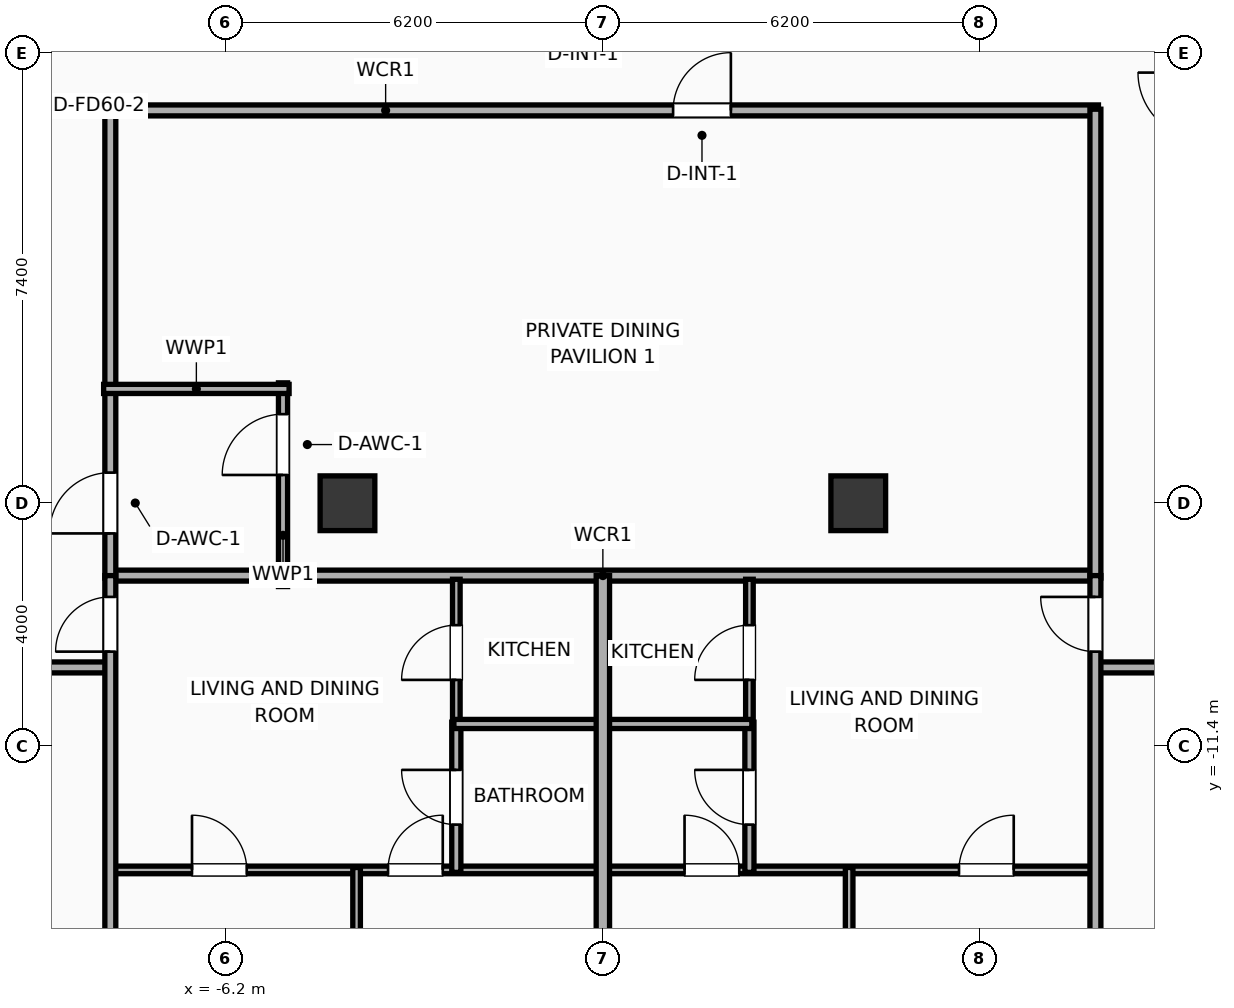
"""IFC4 building model, lengths in metres.
Left out: names, types, materials, properties, quantities, classifications, styles, units other than length and angle.
Written with IfcOpenShell. Run it as: python <this file> out.ifc"""

import sys

from ifc_helpers import new_model, si_unit, direction, frame, frame_2d, origin, origin_2d, place, context, subcontext, project, spatial, rectangle, extrude, element, fill, save


model = new_model("IFC4")
c1 = context("Model", 3, precision=1e-05, world=origin(), true_north=direction((0.0, 1.0)))
c2 = subcontext(c1, "Body", "Model", "MODEL_VIEW")
j1 = project(units=[si_unit("LENGTHUNIT", "METRE"), si_unit("PLANEANGLEUNIT", "RADIAN")], contexts=[c1])
p1 = place(None, origin())
s1 = spatial("IfcSite", under=j1, at=p1, CompositionType="ELEMENT")
p2 = place(p1, origin())
s2 = spatial("IfcBuilding", under=s1, at=p2, CompositionType="ELEMENT")
p3 = place(p2, frame((0.0, 0.0, 179.4)))
s3 = spatial("IfcBuildingStorey", under=s2, at=p3, CompositionType="ELEMENT", Elevation=179.4)
for number, where, z_axis, x_axis in (
    (1, (-4.2, -7.4, 0.0), (0.0, 0.0, 1.0), (1.0, 0.0, 0.0)),
    (2, (4.2, -7.4, 0.0), (0.0, 0.0, 1.0), (1.0, 0.0, 0.0)),
):
    element("IfcColumn", number, at=place(p3, frame(where, z_axis=z_axis, x_axis=x_axis)), inside=s3, PredefinedType="COLUMN", context=c2, shape_type="SweptSolid", body=[
        extrude(rectangle(XDim=0.9, YDim=0.9, at=origin_2d()), origin(), (0.0, 0.0, 1.0), 3.9),
    ])
p4 = place(p3, frame((-8.15, -8.59, 0.0), z_axis=(0.0, 0.0, 1.0), x_axis=(1.0, 0.0, 0.0)))
e3 = element("IfcWall", 3, at=p4, inside=s3, PredefinedType="PARTITIONING", context=c2, shape_type="SweptSolid", body=[
    extrude(rectangle(XDim=16.3, YDim=0.18, at=frame_2d((8.15, 0.0))), origin(), (0.0, 0.0, 1.0), 3.65),
])
p5 = place(p3, frame((-8.15, -0.94, 0.0), z_axis=(0.0, 0.0, 1.0), x_axis=(1.0, 0.0, 0.0)))
e4 = element("IfcWall", 4, at=p5, inside=s3, PredefinedType="PARTITIONING", context=c2, shape_type="SweptSolid", body=[
    extrude(rectangle(XDim=16.3, YDim=0.18, at=frame_2d((8.15, 0.0))), origin(), (0.0, 0.0, 1.0), 3.65),
])
p6 = place(p5, frame((9.305, 0.0, 0.0)))
e5 = element("IfcOpeningElement", 5, at=p6, cuts=e4, PredefinedType="OPENING", context=c2, shape_type="SweptSolid", body=[
    extrude(rectangle(XDim=0.95, YDim=2.05, at=frame_2d((0.475, 1.025))), frame((0.0, 0.1, 0.0), z_axis=(0.0, -1.0, 0.0), x_axis=(1.0, 0.0, 0.0)), (0.0, 0.0, 1.0), 0.2),
])
p7 = place(p3, frame((-8.1, -8.63, 0.0), z_axis=(0.0, 0.0, 1.0), x_axis=(0.0, 1.0, 0.0)))
e6 = element("IfcWall", 6, at=p7, inside=s3, PredefinedType="PARTITIONING", context=c2, shape_type="SweptSolid", body=[
    extrude(rectangle(XDim=7.71, YDim=0.18, at=frame_2d((3.855, 0.0))), origin(), (0.0, 0.0, 1.0), 3.65),
])
p8 = place(p7, frame((0.734, 0.0, 0.0)))
e7 = element("IfcOpeningElement", 7, at=p8, cuts=e6, PredefinedType="OPENING", context=c2, shape_type="SweptSolid", body=[
    extrude(rectangle(XDim=1.0, YDim=2.05, at=frame_2d((0.5, 1.025))), frame((0.0, 0.1, 0.0), z_axis=(0.0, -1.0, 0.0), x_axis=(1.0, 0.0, 0.0)), (0.0, 0.0, 1.0), 0.2),
])
p9 = place(p3, frame((8.1, -8.63, 0.0), z_axis=(0.0, 0.0, 1.0), x_axis=(0.0, 1.0, 0.0)))
e8 = element("IfcWall", 8, at=p9, inside=s3, PredefinedType="PARTITIONING", context=c2, shape_type="SweptSolid", body=[
    extrude(rectangle(XDim=7.71, YDim=0.18, at=frame_2d((3.855, 0.0))), origin(), (0.0, 0.0, 1.0), 3.65),
])
p10 = place(p3, frame((-5.26, -8.77, 0.0), z_axis=(0.0, 0.0, 1.0), x_axis=(0.0, 1.0, 0.0)))
e9 = element("IfcWall", 9, at=p10, inside=s3, PredefinedType="PLUMBINGWALL", context=c2, shape_type="SweptSolid", body=[
    extrude(rectangle(XDim=3.35, YDim=0.15, at=frame_2d((1.675, 0.0))), origin(), (0.0, 0.0, 1.0), 3.65),
])
p11 = place(p10, frame((1.835, 0.0, 0.0)))
e10 = element("IfcOpeningElement", 10, at=p11, cuts=e9, PredefinedType="OPENING", context=c2, shape_type="SweptSolid", body=[
    extrude(rectangle(XDim=1.0, YDim=2.05, at=frame_2d((0.5, 1.025))), frame((0.0, 0.085, 0.0), z_axis=(0.0, -1.0, 0.0), x_axis=(1.0, 0.0, 0.0)), (0.0, 0.0, 1.0), 0.17),
])
p12 = place(p3, frame((-8.21, -5.52, 0.0), z_axis=(0.0, 0.0, 1.0), x_axis=(1.0, 0.0, 0.0)))
e11 = element("IfcWall", 11, at=p12, inside=s3, PredefinedType="PLUMBINGWALL", context=c2, shape_type="SweptSolid", body=[
    extrude(rectangle(XDim=3.05, YDim=0.15, at=frame_2d((1.525, 0.0))), origin(), (0.0, 0.0, 1.0), 3.65),
])
p13 = place(p3, frame((-19.5, -10.1, 0.0), z_axis=(0.0, 0.0, 1.0), x_axis=(1.0, 0.0, 0.0)))
e12 = element("IfcWall", 12, at=p13, inside=s3, PredefinedType="PARTITIONING", context=c2, shape_type="SweptSolid", body=[
    extrude(rectangle(XDim=11.42, YDim=0.18, at=frame_2d((5.71, 0.0))), origin(), (0.0, 0.0, 1.0), 3.65),
])
p14 = place(p13, frame((2.623, 0.0, 0.0)))
e13 = element("IfcOpeningElement", 13, at=p14, cuts=e12, PredefinedType="OPENING", context=c2, shape_type="SweptSolid", body=[
    extrude(rectangle(XDim=0.9, YDim=2.05, at=frame_2d((0.45, 1.025))), frame((0.0, 0.1, 0.0), z_axis=(0.0, -1.0, 0.0), x_axis=(1.0, 0.0, 0.0)), (0.0, 0.0, 1.0), 0.2),
])
p15 = place(p13, frame((9.189, 0.0, 0.0)))
e14 = element("IfcOpeningElement", 14, at=p15, cuts=e12, PredefinedType="OPENING", context=c2, shape_type="SweptSolid", body=[
    extrude(rectangle(XDim=1.15, YDim=2.05, at=frame_2d((0.575, 1.025))), frame((0.0, 0.1, 0.0), z_axis=(0.0, -1.0, 0.0), x_axis=(1.0, 0.0, 0.0)), (0.0, 0.0, 1.0), 0.2),
])
p16 = place(p3, frame((8.08, -10.1, 0.0), z_axis=(0.0, 0.0, 1.0), x_axis=(1.0, 0.0, 0.0)))
e15 = element("IfcWall", 15, at=p16, inside=s3, PredefinedType="PARTITIONING", context=c2, shape_type="SweptSolid", body=[
    extrude(rectangle(XDim=11.42, YDim=0.18, at=frame_2d((5.71, 0.0))), origin(), (0.0, 0.0, 1.0), 3.65),
])
p17 = place(p16, frame((1.175, 0.0, 0.0)))
e16 = element("IfcOpeningElement", 16, at=p17, cuts=e15, PredefinedType="OPENING", context=c2, shape_type="SweptSolid", body=[
    extrude(rectangle(XDim=1.15, YDim=2.05, at=frame_2d((0.575, 1.025))), frame((0.0, 0.1, 0.0), z_axis=(0.0, -1.0, 0.0), x_axis=(1.0, 0.0, 0.0)), (0.0, 0.0, 1.0), 0.2),
])
p18 = place(p16, frame((6.87, 0.0, 0.0)))
e17 = element("IfcOpeningElement", 17, at=p18, cuts=e15, PredefinedType="OPENING", context=c2, shape_type="SweptSolid", body=[
    extrude(rectangle(XDim=1.15, YDim=2.05, at=frame_2d((0.575, 1.025))), frame((0.0, 0.1, 0.0), z_axis=(0.0, -1.0, 0.0), x_axis=(1.0, 0.0, 0.0)), (0.0, 0.0, 1.0), 0.2),
])
p19 = place(p3, frame((-8.08, -13.43, 0.0), z_axis=(0.0, 0.0, 1.0), x_axis=(1.0, 0.0, 0.0)))
e18 = element("IfcWall", 18, at=p19, inside=s3, PredefinedType="PARTITIONING", context=c2, shape_type="SweptSolid", body=[
    extrude(rectangle(XDim=8.06, YDim=0.125, at=frame_2d((4.03, 0.0))), origin(), (0.0, 0.0, 1.0), 3.65),
])
p20 = place(p19, frame((1.323, 0.0, 0.0)))
e19 = element("IfcOpeningElement", 19, at=p20, cuts=e18, PredefinedType="OPENING", context=c2, shape_type="SweptSolid", body=[
    extrude(rectangle(XDim=0.9, YDim=2.05, at=frame_2d((0.45, 1.025))), frame((0.0, 0.073, 0.0), z_axis=(0.0, -1.0, 0.0), x_axis=(1.0, 0.0, 0.0)), (0.0, 0.0, 1.0), 0.145),
])
p21 = place(p19, frame((4.547, 0.0, 0.0)))
e20 = element("IfcOpeningElement", 20, at=p21, cuts=e18, PredefinedType="OPENING", context=c2, shape_type="SweptSolid", body=[
    extrude(rectangle(XDim=0.9, YDim=2.05, at=frame_2d((0.45, 1.025))), frame((0.0, 0.073, 0.0), z_axis=(0.0, -1.0, 0.0), x_axis=(1.0, 0.0, 0.0)), (0.0, 0.0, 1.0), 0.145),
])
p22 = place(p3, frame((-2.41, -11.06, 0.0), z_axis=(0.0, 0.0, 1.0), x_axis=(0.0, 1.0, 0.0)))
e21 = element("IfcWall", 21, at=p22, inside=s3, PredefinedType="PARTITIONING", context=c2, shape_type="SweptSolid", body=[
    extrude(rectangle(XDim=2.41, YDim=0.125, at=frame_2d((1.205, 0.0))), origin(), (0.0, 0.0, 1.0), 3.65),
])
p23 = place(p22, frame((0.755, 0.0, 0.0)))
e22 = element("IfcOpeningElement", 22, at=p23, cuts=e21, PredefinedType="OPENING", context=c2, shape_type="SweptSolid", body=[
    extrude(rectangle(XDim=0.9, YDim=2.05, at=frame_2d((0.45, 1.025))), frame((0.0, 0.073, 0.0), z_axis=(0.0, -1.0, 0.0), x_axis=(1.0, 0.0, 0.0)), (0.0, 0.0, 1.0), 0.145),
])
p24 = place(p3, frame((-2.41, -13.47, 0.0), z_axis=(0.0, 0.0, 1.0), x_axis=(0.0, 1.0, 0.0)))
e23 = element("IfcWall", 23, at=p24, inside=s3, PredefinedType="PLUMBINGWALL", context=c2, shape_type="SweptSolid", body=[
    extrude(rectangle(XDim=2.47, YDim=0.15, at=frame_2d((1.235, 0.0))), origin(), (0.0, 0.0, 1.0), 3.65),
])
p25 = place(p24, frame((0.785, 0.0, 0.0)))
e24 = element("IfcOpeningElement", 24, at=p25, cuts=e23, PredefinedType="OPENING", context=c2, shape_type="SweptSolid", body=[
    extrude(rectangle(XDim=0.9, YDim=2.05, at=frame_2d((0.45, 1.025))), frame((0.0, 0.085, 0.0), z_axis=(0.0, -1.0, 0.0), x_axis=(1.0, 0.0, 0.0)), (0.0, 0.0, 1.0), 0.17),
])
p26 = place(p3, frame((-2.45, -11.03, 0.0), z_axis=(0.0, 0.0, 1.0), x_axis=(1.0, 0.0, 0.0)))
e25 = element("IfcWall", 25, at=p26, inside=s3, PredefinedType="PLUMBINGWALL", context=c2, shape_type="SweptSolid", body=[
    extrude(rectangle(XDim=2.43, YDim=0.15, at=frame_2d((1.215, 0.0))), origin(), (0.0, 0.0, 1.0), 3.65),
])
p27 = place(p3, frame((-4.05, -21.031, 0.0), z_axis=(0.0, 0.0, 1.0), x_axis=(0.0, 1.0, 0.0)))
e26 = element("IfcWall", 26, at=p27, inside=s3, PredefinedType="PARTITIONING", context=c2, shape_type="SweptSolid", body=[
    extrude(rectangle(XDim=7.641, YDim=0.125, at=frame_2d((3.82, 0.0))), origin(), (0.0, 0.0, 1.0), 3.65),
])
p28 = place(p3, frame((-8.1, -21.456, 0.0), z_axis=(0.0, 0.0, 1.0), x_axis=(0.0, 1.0, 0.0)))
e27 = element("IfcWall", 27, at=p28, inside=s3, PredefinedType="PARTITIONING", context=c2, shape_type="SweptSolid", body=[
    extrude(rectangle(XDim=12.866, YDim=0.18, at=frame_2d((6.433, 0.0))), origin(), (0.0, 0.0, 1.0), 3.65),
])
p29 = place(p28, frame((11.616, 0.0, 0.0)))
e28 = element("IfcOpeningElement", 28, at=p29, cuts=e27, PredefinedType="OPENING", context=c2, shape_type="SweptSolid", body=[
    extrude(rectangle(XDim=0.9, YDim=2.05, at=frame_2d((0.45, 1.025))), frame((0.0, 0.1, 0.0), z_axis=(0.0, -1.0, 0.0), x_axis=(1.0, 0.0, 0.0)), (0.0, 0.0, 1.0), 0.2),
])
p30 = place(p3, frame((0.02, -13.43, 0.0), z_axis=(0.0, 0.0, 1.0), x_axis=(1.0, 0.0, 0.0)))
e29 = element("IfcWall", 29, at=p30, inside=s3, PredefinedType="PARTITIONING", context=c2, shape_type="SweptSolid", body=[
    extrude(rectangle(XDim=8.06, YDim=0.125, at=frame_2d((4.03, 0.0))), origin(), (0.0, 0.0, 1.0), 3.65),
])
p31 = place(p30, frame((1.323, 0.0, 0.0)))
e30 = element("IfcOpeningElement", 30, at=p31, cuts=e29, PredefinedType="OPENING", context=c2, shape_type="SweptSolid", body=[
    extrude(rectangle(XDim=0.9, YDim=2.05, at=frame_2d((0.45, 1.025))), frame((0.0, 0.073, 0.0), z_axis=(0.0, -1.0, 0.0), x_axis=(1.0, 0.0, 0.0)), (0.0, 0.0, 1.0), 0.145),
])
p32 = place(p30, frame((5.837, 0.0, 0.0)))
e31 = element("IfcOpeningElement", 31, at=p32, cuts=e29, PredefinedType="OPENING", context=c2, shape_type="SweptSolid", body=[
    extrude(rectangle(XDim=0.9, YDim=2.05, at=frame_2d((0.45, 1.025))), frame((0.0, 0.073, 0.0), z_axis=(0.0, -1.0, 0.0), x_axis=(1.0, 0.0, 0.0)), (0.0, 0.0, 1.0), 0.145),
])
p33 = place(p3, frame((2.41, -11.06, 0.0), z_axis=(0.0, 0.0, 1.0), x_axis=(0.0, 1.0, 0.0)))
e32 = element("IfcWall", 32, at=p33, inside=s3, PredefinedType="PARTITIONING", context=c2, shape_type="SweptSolid", body=[
    extrude(rectangle(XDim=2.41, YDim=0.125, at=frame_2d((1.205, 0.0))), origin(), (0.0, 0.0, 1.0), 3.65),
])
p34 = place(p33, frame((0.755, 0.0, 0.0)))
e33 = element("IfcOpeningElement", 33, at=p34, cuts=e32, PredefinedType="OPENING", context=c2, shape_type="SweptSolid", body=[
    extrude(rectangle(XDim=0.9, YDim=2.05, at=frame_2d((0.45, 1.025))), frame((0.0, 0.073, 0.0), z_axis=(0.0, -1.0, 0.0), x_axis=(1.0, 0.0, 0.0)), (0.0, 0.0, 1.0), 0.145),
])
p35 = place(p3, frame((2.41, -13.47, 0.0), z_axis=(0.0, 0.0, 1.0), x_axis=(0.0, 1.0, 0.0)))
e34 = element("IfcWall", 34, at=p35, inside=s3, PredefinedType="PLUMBINGWALL", context=c2, shape_type="SweptSolid", body=[
    extrude(rectangle(XDim=2.47, YDim=0.15, at=frame_2d((1.235, 0.0))), origin(), (0.0, 0.0, 1.0), 3.65),
])
p36 = place(p35, frame((0.785, 0.0, 0.0)))
e35 = element("IfcOpeningElement", 35, at=p36, cuts=e34, PredefinedType="OPENING", context=c2, shape_type="SweptSolid", body=[
    extrude(rectangle(XDim=0.9, YDim=2.05, at=frame_2d((0.45, 1.025))), frame((0.0, 0.085, 0.0), z_axis=(0.0, -1.0, 0.0), x_axis=(1.0, 0.0, 0.0)), (0.0, 0.0, 1.0), 0.17),
])
p37 = place(p3, frame((0.02, -11.03, 0.0), z_axis=(0.0, 0.0, 1.0), x_axis=(1.0, 0.0, 0.0)))
e36 = element("IfcWall", 36, at=p37, inside=s3, PredefinedType="PLUMBINGWALL", context=c2, shape_type="SweptSolid", body=[
    extrude(rectangle(XDim=2.43, YDim=0.15, at=frame_2d((1.215, 0.0))), origin(), (0.0, 0.0, 1.0), 3.65),
])
p38 = place(p3, frame((4.05, -20.179, 0.0), z_axis=(0.0, 0.0, 1.0), x_axis=(0.0, 1.0, 0.0)))
e37 = element("IfcWall", 37, at=p38, inside=s3, PredefinedType="PARTITIONING", context=c2, shape_type="SweptSolid", body=[
    extrude(rectangle(XDim=6.79, YDim=0.125, at=frame_2d((3.395, 0.0))), origin(), (0.0, 0.0, 1.0), 3.04),
])
p39 = place(p3, frame((8.1, -19.754, 0.0), z_axis=(0.0, 0.0, 1.0), x_axis=(0.0, 1.0, 0.0)))
e38 = element("IfcWall", 38, at=p39, inside=s3, PredefinedType="PARTITIONING", context=c2, shape_type="SweptSolid", body=[
    extrude(rectangle(XDim=11.164, YDim=0.18, at=frame_2d((5.582, 0.0))), origin(), (0.0, 0.0, 1.0), 3.65),
])
p40 = place(p39, frame((9.913, 0.0, 0.0)))
e39 = element("IfcOpeningElement", 39, at=p40, cuts=e38, PredefinedType="OPENING", context=c2, shape_type="SweptSolid", body=[
    extrude(rectangle(XDim=0.9, YDim=2.05, at=frame_2d((0.45, 1.025))), frame((0.0, 0.1, 0.0), z_axis=(0.0, -1.0, 0.0), x_axis=(1.0, 0.0, 0.0)), (0.0, 0.0, 1.0), 0.2),
])
p41 = place(p3, frame((0.0, -20.605, 0.0), z_axis=(0.0, 0.0, 1.0), x_axis=(0.0, 1.0, 0.0)))
e40 = element("IfcWall", 40, at=p41, inside=s3, PredefinedType="PARTITIONING", context=c2, shape_type="SweptSolid", body=[
    extrude(rectangle(XDim=12.015, YDim=0.22, at=frame_2d((6.007, 0.0))), origin(), (0.0, 0.0, 1.0), 3.65),
])
p42 = place(p6, origin())
e41 = element("IfcDoor", 41, at=p42, inside=s3, OperationType="SINGLE_SWING_RIGHT", PredefinedType="DOOR", context=c2, shape_type="SweptSolid", body=[
    extrude(rectangle(XDim=0.95, YDim=2.05, at=frame_2d((0.475, 1.025))), frame((0.0, 0.025, 0.0), z_axis=(0.0, -1.0, 0.0), x_axis=(1.0, 0.0, 0.0)), (0.0, 0.0, 1.0), 0.05),
])
fill(e5, e41)
p43 = place(p8, origin())
e42 = element("IfcDoor", 42, at=p43, inside=s3, OperationType="SINGLE_SWING_LEFT", PredefinedType="DOOR", context=c2, shape_type="SweptSolid", body=[
    extrude(rectangle(XDim=1.0, YDim=2.05, at=frame_2d((0.5, 1.025))), frame((0.0, 0.025, 0.0), z_axis=(0.0, -1.0, 0.0), x_axis=(1.0, 0.0, 0.0)), (0.0, 0.0, 1.0), 0.05),
])
fill(e7, e42)
p44 = place(p11, origin())
e43 = element("IfcDoor", 43, at=p44, inside=s3, OperationType="SINGLE_SWING_LEFT", PredefinedType="DOOR", context=c2, shape_type="SweptSolid", body=[
    extrude(rectangle(XDim=1.0, YDim=2.05, at=frame_2d((0.5, 1.025))), frame((0.0, 0.025, 0.0), z_axis=(0.0, -1.0, 0.0), x_axis=(1.0, 0.0, 0.0)), (0.0, 0.0, 1.0), 0.05),
])
fill(e10, e43)
p45 = place(p20, origin())
e44 = element("IfcDoor", 44, at=p45, inside=s3, OperationType="SINGLE_SWING_LEFT", PredefinedType="DOOR", context=c2, shape_type="SweptSolid", body=[
    extrude(rectangle(XDim=0.9, YDim=2.05, at=frame_2d((0.45, 1.025))), frame((0.0, 0.025, 0.0), z_axis=(0.0, -1.0, 0.0), x_axis=(1.0, 0.0, 0.0)), (0.0, 0.0, 1.0), 0.05),
])
fill(e19, e44)
p46 = place(p21, origin())
e45 = element("IfcDoor", 45, at=p46, inside=s3, OperationType="SINGLE_SWING_RIGHT", PredefinedType="DOOR", context=c2, shape_type="SweptSolid", body=[
    extrude(rectangle(XDim=0.9, YDim=2.05, at=frame_2d((0.45, 1.025))), frame((0.0, 0.025, 0.0), z_axis=(0.0, -1.0, 0.0), x_axis=(1.0, 0.0, 0.0)), (0.0, 0.0, 1.0), 0.05),
])
fill(e20, e45)
p47 = place(p23, origin())
e46 = element("IfcDoor", 46, at=p47, inside=s3, OperationType="SINGLE_SWING_LEFT", PredefinedType="DOOR", context=c2, shape_type="SweptSolid", body=[
    extrude(rectangle(XDim=0.9, YDim=2.05, at=frame_2d((0.45, 1.025))), frame((0.0, 0.025, 0.0), z_axis=(0.0, -1.0, 0.0), x_axis=(1.0, 0.0, 0.0)), (0.0, 0.0, 1.0), 0.05),
])
fill(e22, e46)
p48 = place(p25, origin())
e47 = element("IfcDoor", 47, at=p48, inside=s3, OperationType="SINGLE_SWING_RIGHT", PredefinedType="DOOR", context=c2, shape_type="SweptSolid", body=[
    extrude(rectangle(XDim=0.9, YDim=2.05, at=frame_2d((0.45, 1.025))), frame((0.0, 0.025, 0.0), z_axis=(0.0, -1.0, 0.0), x_axis=(1.0, 0.0, 0.0)), (0.0, 0.0, 1.0), 0.05),
])
fill(e24, e47)
p49 = place(p29, origin())
e48 = element("IfcDoor", 48, at=p49, inside=s3, OperationType="SINGLE_SWING_LEFT", PredefinedType="DOOR", context=c2, shape_type="SweptSolid", body=[
    extrude(rectangle(XDim=0.9, YDim=2.05, at=frame_2d((0.45, 1.025))), frame((0.0, 0.025, 0.0), z_axis=(0.0, -1.0, 0.0), x_axis=(1.0, 0.0, 0.0)), (0.0, 0.0, 1.0), 0.05),
])
fill(e28, e48)
p50 = place(p31, origin())
e49 = element("IfcDoor", 49, at=p50, inside=s3, OperationType="SINGLE_SWING_LEFT", PredefinedType="DOOR", context=c2, shape_type="SweptSolid", body=[
    extrude(rectangle(XDim=0.9, YDim=2.05, at=frame_2d((0.45, 1.025))), frame((0.0, 0.025, 0.0), z_axis=(0.0, -1.0, 0.0), x_axis=(1.0, 0.0, 0.0)), (0.0, 0.0, 1.0), 0.05),
])
fill(e30, e49)
p51 = place(p32, origin())
e50 = element("IfcDoor", 50, at=p51, inside=s3, OperationType="SINGLE_SWING_RIGHT", PredefinedType="DOOR", context=c2, shape_type="SweptSolid", body=[
    extrude(rectangle(XDim=0.9, YDim=2.05, at=frame_2d((0.45, 1.025))), frame((0.0, 0.025, 0.0), z_axis=(0.0, -1.0, 0.0), x_axis=(1.0, 0.0, 0.0)), (0.0, 0.0, 1.0), 0.05),
])
fill(e31, e50)
p52 = place(p34, origin())
e51 = element("IfcDoor", 51, at=p52, inside=s3, OperationType="SINGLE_SWING_LEFT", PredefinedType="DOOR", context=c2, shape_type="SweptSolid", body=[
    extrude(rectangle(XDim=0.9, YDim=2.05, at=frame_2d((0.45, 1.025))), frame((0.0, 0.025, 0.0), z_axis=(0.0, -1.0, 0.0), x_axis=(1.0, 0.0, 0.0)), (0.0, 0.0, 1.0), 0.05),
])
fill(e33, e51)
p53 = place(p36, origin())
e52 = element("IfcDoor", 52, at=p53, inside=s3, OperationType="SINGLE_SWING_RIGHT", PredefinedType="DOOR", context=c2, shape_type="SweptSolid", body=[
    extrude(rectangle(XDim=0.9, YDim=2.05, at=frame_2d((0.45, 1.025))), frame((0.0, 0.025, 0.0), z_axis=(0.0, -1.0, 0.0), x_axis=(1.0, 0.0, 0.0)), (0.0, 0.0, 1.0), 0.05),
])
fill(e35, e52)
p54 = place(p40, origin())
e53 = element("IfcDoor", 53, at=p54, inside=s3, OperationType="SINGLE_SWING_RIGHT", PredefinedType="DOOR", context=c2, shape_type="SweptSolid", body=[
    extrude(rectangle(XDim=0.9, YDim=2.05, at=frame_2d((0.45, 1.025))), frame((0.0, 0.025, 0.0), z_axis=(0.0, -1.0, 0.0), x_axis=(1.0, 0.0, 0.0)), (0.0, 0.0, 1.0), 0.05),
])
fill(e39, e53)
save(model, sys.argv[1])
